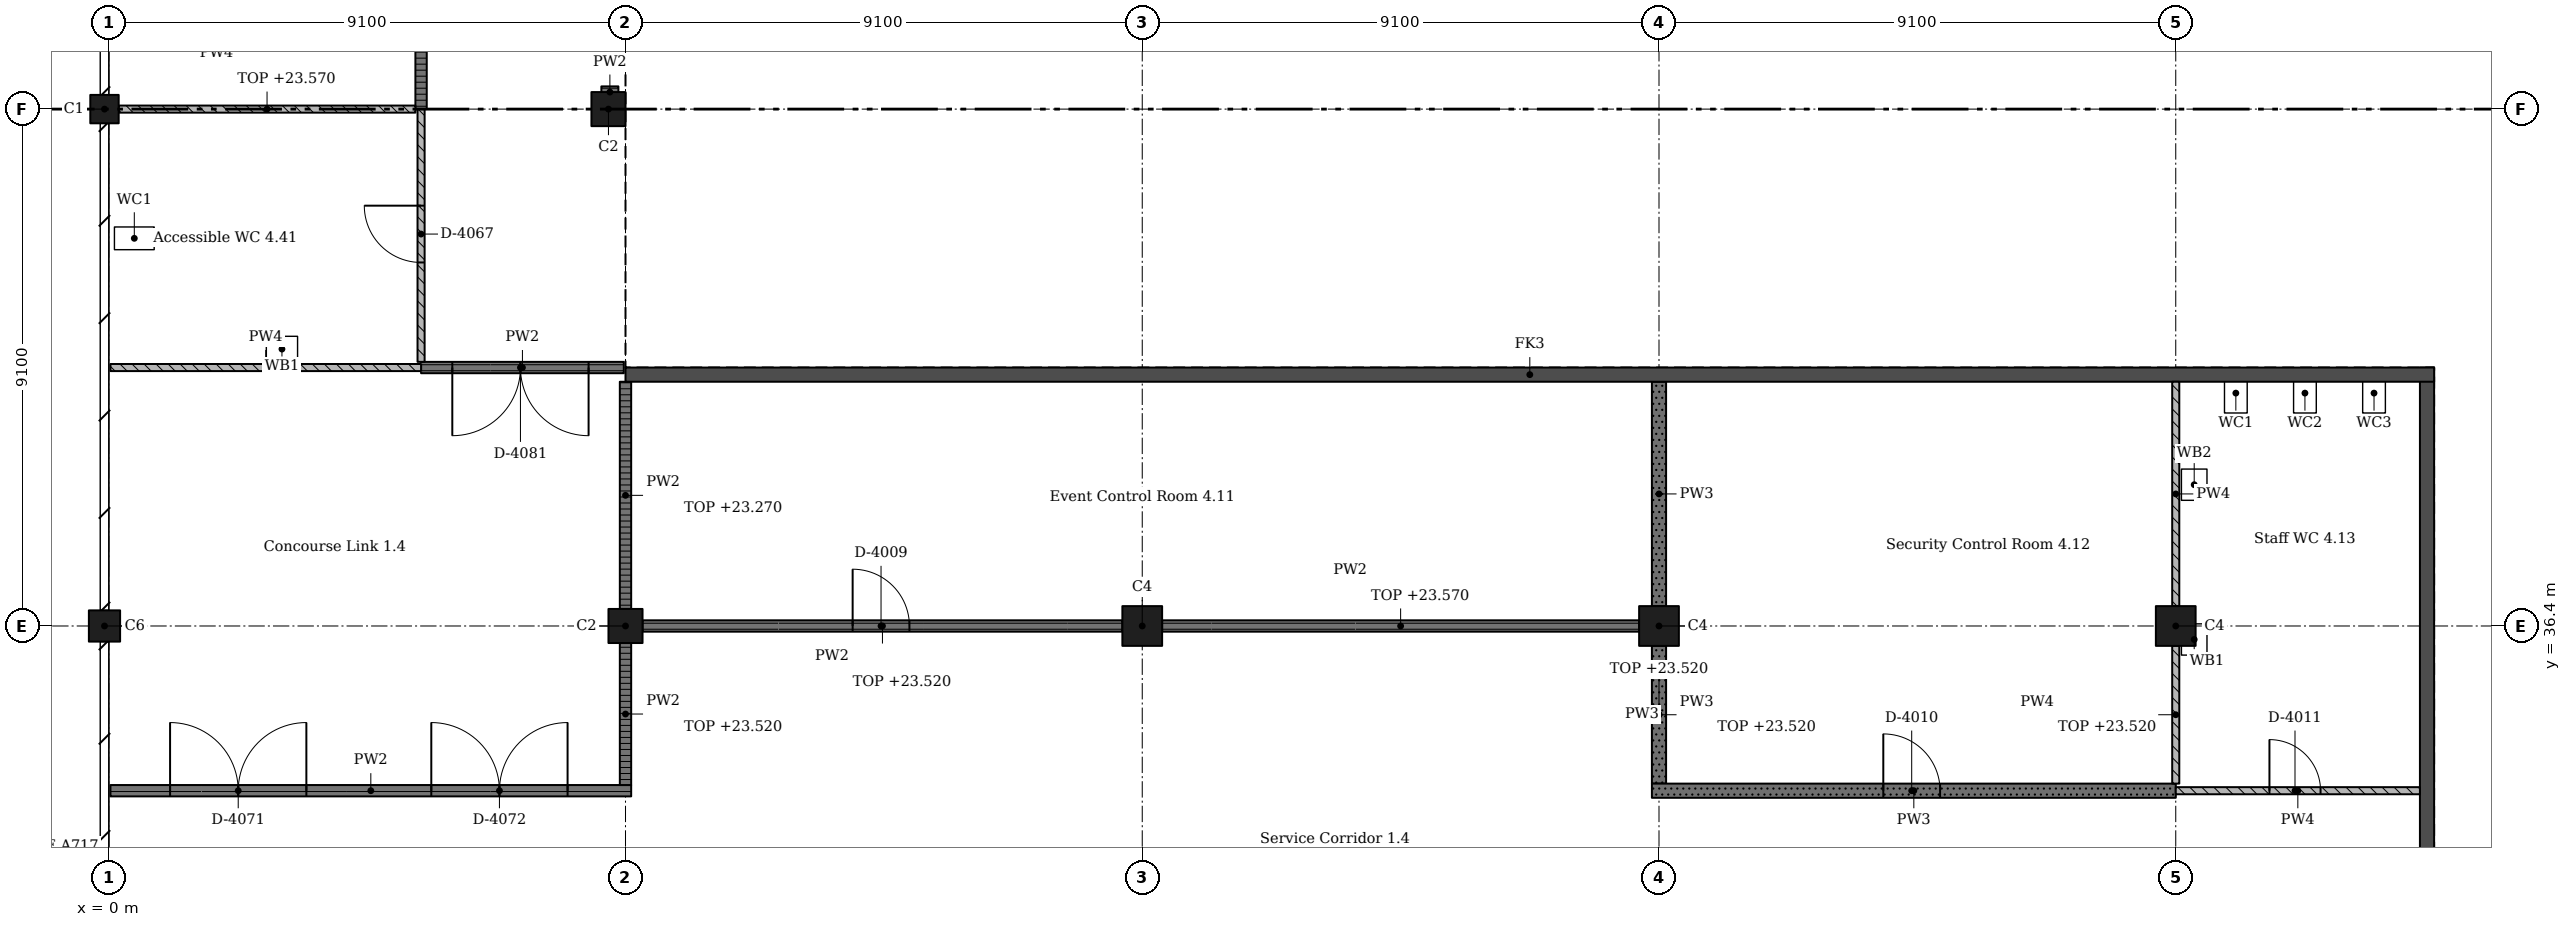
"""IFC4 building model, lengths in metres.
Left out: names, types, materials, properties, quantities, classifications, styles, units other than length and angle.
Written with IfcOpenShell. Run it as: python <this file> out.ifc"""

import sys

from ifc_helpers import new_model, si_unit, direction, frame, frame_2d, origin, origin_2d, place, context, subcontext, project, spatial, rectangle, extrude, element, fill, save


model = new_model("IFC4")
c1 = context("Model", 3, precision=1e-05, world=origin(), true_north=direction((0.0, 1.0)))
c2 = subcontext(c1, "Body", "Model", "MODEL_VIEW")
j1 = project(units=[si_unit("LENGTHUNIT", "METRE"), si_unit("PLANEANGLEUNIT", "RADIAN")], contexts=[c1])
p1 = place(None, origin())
s1 = spatial("IfcSite", under=j1, at=p1, CompositionType="ELEMENT")
p2 = place(p1, origin())
s2 = spatial("IfcBuilding", under=s1, at=p2, CompositionType="ELEMENT")
p3 = place(p2, frame((0.0, 0.0, 20.02)))
s3 = spatial("IfcBuildingStorey", under=s2, at=p3, CompositionType="ELEMENT", Elevation=20.02)
p4 = place(p3, frame((-0.075, 36.4, 0.0), z_axis=(0.0, 0.0, 1.0), x_axis=(1.0, 0.0, 0.0)))
e1 = element("IfcColumn", 1, at=p4, inside=s3, PredefinedType="COLUMN", context=c2, shape_type="SweptSolid", body=[
    extrude(rectangle(XDim=0.55, YDim=0.55, at=origin_2d()), origin(), (0.0, 0.0, 1.0), 4.55),
])
p5 = place(p3, frame((-0.075, 45.5, 0.0), z_axis=(0.0, 0.0, 1.0), x_axis=(1.0, 0.0, 0.0)))
e2 = element("IfcColumn", 2, at=p5, inside=s3, PredefinedType="COLUMN", context=c2, shape_type="SweptSolid", body=[
    extrude(rectangle(XDim=0.5, YDim=0.5, at=origin_2d()), origin(), (0.0, 0.0, 1.0), 4.55),
])
for number, where, z_axis, x_axis in (
    (3, (9.1, 36.4, 0.0), (0.0, 0.0, 1.0), (1.0, 0.0, 0.0)),
    (4, (8.8, 45.5, 0.0), (0.0, 0.0, 1.0), (1.0, 0.0, 0.0)),
):
    element("IfcColumn", number, at=place(p3, frame(where, z_axis=z_axis, x_axis=x_axis)), inside=s3, PredefinedType="COLUMN", context=c2, shape_type="SweptSolid", body=[
        extrude(rectangle(XDim=0.6, YDim=0.6, at=origin_2d()), origin(), (0.0, 0.0, 1.0), 4.55),
    ])
for number, where, z_axis, x_axis in (
    (5, (18.2, 36.4, 0.0), (0.0, 0.0, 1.0), (1.0, 0.0, 0.0)),
    (6, (27.3, 36.4, 0.0), (0.0, 0.0, 1.0), (1.0, 0.0, 0.0)),
    (7, (36.4, 36.4, 0.0), (0.0, 0.0, 1.0), (1.0, 0.0, 0.0)),
):
    element("IfcColumn", number, at=place(p3, frame(where, z_axis=z_axis, x_axis=x_axis)), inside=s3, PredefinedType="COLUMN", context=c2, shape_type="SweptSolid", body=[
        extrude(rectangle(XDim=0.7, YDim=0.7, at=origin_2d()), origin(), (0.0, 0.0, 1.0), 4.55),
    ])
for number, where, z_axis, x_axis in (
    (8, (40.825, 40.95, 0.0), (0.0, 0.0, 1.0), (0.0, -1.0, 0.0)),
    (9, (40.95, 40.825, 0.0), (0.0, 0.0, 1.0), (-1.0, 0.0, 0.0)),
):
    element("IfcWall", number, at=place(p3, frame(where, z_axis=z_axis, x_axis=x_axis)), inside=s3, PredefinedType="SHEAR", context=c2, shape_type="SweptSolid", body=[
        extrude(rectangle(XDim=31.85, YDim=0.25, at=frame_2d((15.925, 0.0))), origin(), (0.0, 0.0, 1.0), 4.55),
    ])
p6 = place(p3, frame((0.03, 33.5, 0.0), z_axis=(0.0, 0.0, 1.0), x_axis=(1.0, 0.0, 0.0)))
e10 = element("IfcWall", 10, at=p6, inside=s3, PredefinedType="PARTITIONING", context=c2, shape_type="SweptSolid", body=[
    extrude(rectangle(XDim=9.17, YDim=0.2, at=frame_2d((4.585, 0.0))), origin(), (0.0, 0.0, 1.0), 4.25),
])
p7 = place(p6, frame((1.05, 0.0, 0.0)))
e11 = element("IfcOpeningElement", 11, at=p7, cuts=e10, PredefinedType="OPENING", context=c2, shape_type="SweptSolid", body=[
    extrude(rectangle(XDim=2.4, YDim=2.4, at=frame_2d((1.2, 1.2))), frame((0.0, 0.11, 0.0), z_axis=(0.0, -1.0, 0.0), x_axis=(1.0, 0.0, 0.0)), (0.0, 0.0, 1.0), 0.22),
])
p8 = place(p6, frame((5.65, 0.0, 0.0)))
e12 = element("IfcOpeningElement", 12, at=p8, cuts=e10, PredefinedType="OPENING", context=c2, shape_type="SweptSolid", body=[
    extrude(rectangle(XDim=2.4, YDim=2.4, at=frame_2d((1.2, 1.2))), frame((0.0, 0.11, 0.0), z_axis=(0.0, -1.0, 0.0), x_axis=(1.0, 0.0, 0.0)), (0.0, 0.0, 1.0), 0.22),
])
p9 = place(p3, frame((0.03, 40.95, 0.0), z_axis=(0.0, 0.0, 1.0), x_axis=(1.0, 0.0, 0.0)))
e13 = element("IfcWall", 13, at=p9, inside=s3, PredefinedType="PARTITIONING", context=c2, shape_type="SweptSolid", body=[
    extrude(rectangle(XDim=5.47, YDim=0.125, at=frame_2d((2.735, 0.0))), origin(), (0.0, 0.0, 1.0), 4.25),
])
p10 = place(p3, frame((0.175, 45.5, 0.0), z_axis=(0.0, 0.0, 1.0), x_axis=(1.0, 0.0, 0.0)))
e14 = element("IfcWall", 14, at=p10, inside=s3, PredefinedType="PARTITIONING", context=c2, shape_type="SweptSolid", body=[
    extrude(rectangle(XDim=5.225, YDim=0.125, at=frame_2d((2.612, 0.0))), origin(), (0.0, 0.0, 1.0), 3.55),
])
p11 = place(p3, frame((5.5, 40.95, 0.0), z_axis=(0.0, 0.0, 1.0), x_axis=(1.0, 0.0, 0.0)))
e15 = element("IfcWall", 15, at=p11, inside=s3, PredefinedType="PARTITIONING", context=c2, shape_type="SweptSolid", body=[
    extrude(rectangle(XDim=3.57, YDim=0.2, at=frame_2d((1.785, 0.0))), origin(), (0.0, 0.0, 1.0), 4.25),
])
p12 = place(p11, frame((0.55, 0.0, 0.0)))
e16 = element("IfcOpeningElement", 16, at=p12, cuts=e15, PredefinedType="OPENING", context=c2, shape_type="SweptSolid", body=[
    extrude(rectangle(XDim=2.4, YDim=2.4, at=frame_2d((1.2, 1.2))), frame((0.0, 0.11, 0.0), z_axis=(0.0, -1.0, 0.0), x_axis=(1.0, 0.0, 0.0)), (0.0, 0.0, 1.0), 0.22),
])
p13 = place(p3, frame((5.5, 41.05, 0.0), z_axis=(0.0, 0.0, 1.0), x_axis=(0.0, 1.0, 0.0)))
e17 = element("IfcWall", 17, at=p13, inside=s3, PredefinedType="PARTITIONING", context=c2, shape_type="SweptSolid", body=[
    extrude(rectangle(XDim=4.45, YDim=0.125, at=frame_2d((2.225, 0.0))), origin(), (0.0, 0.0, 1.0), 4.25),
])
p14 = place(p13, frame((1.75, 0.0, 0.0)))
e18 = element("IfcOpeningElement", 18, at=p14, cuts=e17, PredefinedType="OPENING", context=c2, shape_type="SweptSolid", body=[
    extrude(rectangle(XDim=1.0, YDim=2.1, at=frame_2d((0.5, 1.05))), frame((0.0, 0.073, 0.0), z_axis=(0.0, -1.0, 0.0), x_axis=(1.0, 0.0, 0.0)), (0.0, 0.0, 1.0), 0.145),
])
p15 = place(p3, frame((5.5, 45.5, 0.0), z_axis=(0.0, 0.0, 1.0), x_axis=(0.0, 1.0, 0.0)))
e19 = element("IfcWall", 19, at=p15, inside=s3, PredefinedType="PARTITIONING", context=c2, shape_type="SweptSolid", body=[
    extrude(rectangle(XDim=9.1, YDim=0.2, at=frame_2d((4.55, 0.0))), origin(), (0.0, 0.0, 1.0), 4.25),
])
p16 = place(p15, frame((4.05, 0.0, 0.0)))
e20 = element("IfcOpeningElement", 20, at=p16, cuts=e19, PredefinedType="OPENING", context=c2, shape_type="SweptSolid", body=[
    extrude(rectangle(XDim=1.0, YDim=2.1, at=frame_2d((0.5, 1.05))), frame((0.0, 0.11, 0.0), z_axis=(0.0, -1.0, 0.0), x_axis=(1.0, 0.0, 0.0)), (0.0, 0.0, 1.0), 0.22),
])
p17 = place(p3, frame((8.975, 45.8, 0.0), z_axis=(0.0, 0.0, 1.0), x_axis=(-1.0, 0.0, 0.0)))
e21 = element("IfcWall", 21, at=p17, inside=s3, PredefinedType="PARTITIONING", context=c2, shape_type="SweptSolid", body=[
    extrude(rectangle(XDim=0.3, YDim=0.2, at=frame_2d((0.15, 0.0))), origin(), (0.0, 0.0, 1.0), 4.25),
])
p18 = place(p3, frame((9.1, 33.6, 0.0), z_axis=(0.0, 0.0, 1.0), x_axis=(0.0, 1.0, 0.0)))
e22 = element("IfcWall", 22, at=p18, inside=s3, PredefinedType="PARTITIONING", context=c2, shape_type="SweptSolid", body=[
    extrude(rectangle(XDim=2.5, YDim=0.2, at=frame_2d((1.25, 0.0))), origin(), (0.0, 0.0, 1.0), 3.5),
])
p19 = place(p3, frame((9.1, 36.7, 0.0), z_axis=(0.0, 0.0, 1.0), x_axis=(0.0, 1.0, 0.0)))
e23 = element("IfcWall", 23, at=p19, inside=s3, PredefinedType="PARTITIONING", context=c2, shape_type="SweptSolid", body=[
    extrude(rectangle(XDim=4.0, YDim=0.2, at=frame_2d((2.0, 0.0))), origin(), (0.0, 0.0, 1.0), 3.25),
])
p20 = place(p3, frame((17.85, 36.4, 0.0), z_axis=(0.0, 0.0, 1.0), x_axis=(-1.0, 0.0, 0.0)))
e24 = element("IfcWall", 24, at=p20, inside=s3, PredefinedType="PARTITIONING", context=c2, shape_type="SweptSolid", body=[
    extrude(rectangle(XDim=8.45, YDim=0.2, at=frame_2d((4.225, 0.0))), origin(), (0.0, 0.0, 1.0), 3.5),
])
p21 = place(p20, frame((3.75, 0.0, 0.0)))
e25 = element("IfcOpeningElement", 25, at=p21, cuts=e24, PredefinedType="OPENING", context=c2, shape_type="SweptSolid", body=[
    extrude(rectangle(XDim=1.0, YDim=2.1, at=frame_2d((0.5, 1.05))), frame((0.0, 0.11, 0.0), z_axis=(0.0, -1.0, 0.0), x_axis=(1.0, 0.0, 0.0)), (0.0, 0.0, 1.0), 0.22),
])
p22 = place(p3, frame((26.95, 36.4, 0.0), z_axis=(0.0, 0.0, 1.0), x_axis=(-1.0, 0.0, 0.0)))
e26 = element("IfcWall", 26, at=p22, inside=s3, PredefinedType="PARTITIONING", context=c2, shape_type="SweptSolid", body=[
    extrude(rectangle(XDim=8.4, YDim=0.2, at=frame_2d((4.2, 0.0))), origin(), (0.0, 0.0, 1.0), 3.55),
])
p23 = place(p3, frame((27.3, 33.625, 0.0), z_axis=(0.0, 0.0, 1.0), x_axis=(0.0, 1.0, 0.0)))
e27 = element("IfcWall", 27, at=p23, inside=s3, PredefinedType="SOLIDWALL", context=c2, shape_type="SweptSolid", body=[
    extrude(rectangle(XDim=2.425, YDim=0.25, at=frame_2d((1.212, 0.0))), origin(), (0.0, 0.0, 1.0), 3.5),
])
p24 = place(p3, frame((27.3, 40.7, 0.0), z_axis=(0.0, 0.0, 1.0), x_axis=(0.0, -1.0, 0.0)))
e28 = element("IfcWall", 28, at=p24, inside=s3, PredefinedType="SOLIDWALL", context=c2, shape_type="SweptSolid", body=[
    extrude(rectangle(XDim=3.95, YDim=0.25, at=frame_2d((1.975, 0.0))), origin(), (0.0, 0.0, 1.0), 4.25),
])
p25 = place(p3, frame((36.4, 33.5, 0.0), z_axis=(0.0, 0.0, 1.0), x_axis=(-1.0, 0.0, 0.0)))
e29 = element("IfcWall", 29, at=p25, inside=s3, PredefinedType="SOLIDWALL", context=c2, shape_type="SweptSolid", body=[
    extrude(rectangle(XDim=9.225, YDim=0.25, at=frame_2d((4.612, 0.0))), origin(), (0.0, 0.0, 1.0), 4.25),
])
p26 = place(p25, frame((4.15, 0.0, 0.0)))
e30 = element("IfcOpeningElement", 30, at=p26, cuts=e29, PredefinedType="OPENING", context=c2, shape_type="SweptSolid", body=[
    extrude(rectangle(XDim=1.0, YDim=2.1, at=frame_2d((0.5, 1.05))), frame((0.0, 0.135, 0.0), z_axis=(0.0, -1.0, 0.0), x_axis=(1.0, 0.0, 0.0)), (0.0, 0.0, 1.0), 0.27),
])
p27 = place(p3, frame((36.4, 36.05, 0.0), z_axis=(0.0, 0.0, 1.0), x_axis=(0.0, -1.0, 0.0)))
e31 = element("IfcWall", 31, at=p27, inside=s3, PredefinedType="PARTITIONING", context=c2, shape_type="SweptSolid", body=[
    extrude(rectangle(XDim=2.425, YDim=0.125, at=frame_2d((1.212, 0.0))), origin(), (0.0, 0.0, 1.0), 3.5),
])
p28 = place(p3, frame((36.4, 40.7, 0.0), z_axis=(0.0, 0.0, 1.0), x_axis=(0.0, -1.0, 0.0)))
e32 = element("IfcWall", 32, at=p28, inside=s3, PredefinedType="PARTITIONING", context=c2, shape_type="SweptSolid", body=[
    extrude(rectangle(XDim=3.95, YDim=0.125, at=frame_2d((1.975, 0.0))), origin(), (0.0, 0.0, 1.0), 4.25),
])
p29 = place(p3, frame((40.7, 33.5, 0.0), z_axis=(0.0, 0.0, 1.0), x_axis=(-1.0, 0.0, 0.0)))
e33 = element("IfcWall", 33, at=p29, inside=s3, PredefinedType="PARTITIONING", context=c2, shape_type="SweptSolid", body=[
    extrude(rectangle(XDim=4.3, YDim=0.125, at=frame_2d((2.15, 0.0))), origin(), (0.0, 0.0, 1.0), 4.25),
])
p30 = place(p29, frame((1.75, 0.0, 0.0)))
e34 = element("IfcOpeningElement", 34, at=p30, cuts=e33, PredefinedType="OPENING", context=c2, shape_type="SweptSolid", body=[
    extrude(rectangle(XDim=0.9, YDim=2.1, at=frame_2d((0.45, 1.05))), frame((0.0, 0.073, 0.0), z_axis=(0.0, -1.0, 0.0), x_axis=(1.0, 0.0, 0.0)), (0.0, 0.0, 1.0), 0.145),
])
p31 = place(p21, origin())
e35 = element("IfcDoor", 35, at=p31, inside=s3, OperationType="SINGLE_SWING_RIGHT", PredefinedType="DOOR", context=c2, shape_type="SweptSolid", body=[
    extrude(rectangle(XDim=1.0, YDim=2.1, at=frame_2d((0.5, 1.05))), frame((0.0, 0.025, 0.0), z_axis=(0.0, -1.0, 0.0), x_axis=(1.0, 0.0, 0.0)), (0.0, 0.0, 1.0), 0.05),
])
fill(e25, e35)
p32 = place(p26, origin())
e36 = element("IfcDoor", 36, at=p32, inside=s3, OperationType="SINGLE_SWING_RIGHT", PredefinedType="DOOR", context=c2, shape_type="SweptSolid", body=[
    extrude(rectangle(XDim=1.0, YDim=2.1, at=frame_2d((0.5, 1.05))), frame((0.0, 0.025, 0.0), z_axis=(0.0, -1.0, 0.0), x_axis=(1.0, 0.0, 0.0)), (0.0, 0.0, 1.0), 0.05),
])
fill(e30, e36)
p33 = place(p30, origin())
e37 = element("IfcDoor", 37, at=p33, inside=s3, OperationType="SINGLE_SWING_RIGHT", PredefinedType="DOOR", context=c2, shape_type="SweptSolid", body=[
    extrude(rectangle(XDim=0.9, YDim=2.1, at=frame_2d((0.45, 1.05))), frame((0.0, 0.025, 0.0), z_axis=(0.0, -1.0, 0.0), x_axis=(1.0, 0.0, 0.0)), (0.0, 0.0, 1.0), 0.05),
])
fill(e34, e37)
p34 = place(p14, origin())
e38 = element("IfcDoor", 38, at=p34, inside=s3, OperationType="SINGLE_SWING_LEFT", PredefinedType="DOOR", context=c2, shape_type="SweptSolid", body=[
    extrude(rectangle(XDim=1.0, YDim=2.1, at=frame_2d((0.5, 1.05))), frame((0.0, 0.025, 0.0), z_axis=(0.0, -1.0, 0.0), x_axis=(1.0, 0.0, 0.0)), (0.0, 0.0, 1.0), 0.05),
])
fill(e18, e38)
p35 = place(p7, origin())
e39 = element("IfcDoor", 39, at=p35, inside=s3, OperationType="DOUBLE_DOOR_SINGLE_SWING", PredefinedType="DOOR", context=c2, shape_type="SweptSolid", body=[
    extrude(rectangle(XDim=2.4, YDim=2.4, at=frame_2d((1.2, 1.2))), frame((0.0, 0.025, 0.0), z_axis=(0.0, -1.0, 0.0), x_axis=(1.0, 0.0, 0.0)), (0.0, 0.0, 1.0), 0.05),
])
fill(e11, e39)
p36 = place(p8, origin())
e40 = element("IfcDoor", 40, at=p36, inside=s3, OperationType="DOUBLE_DOOR_SINGLE_SWING", PredefinedType="DOOR", context=c2, shape_type="SweptSolid", body=[
    extrude(rectangle(XDim=2.4, YDim=2.4, at=frame_2d((1.2, 1.2))), frame((0.0, 0.025, 0.0), z_axis=(0.0, -1.0, 0.0), x_axis=(1.0, 0.0, 0.0)), (0.0, 0.0, 1.0), 0.05),
])
fill(e12, e40)
p37 = place(p12, origin())
e41 = element("IfcDoor", 41, at=p37, inside=s3, OperationType="DOUBLE_DOOR_SINGLE_SWING", PredefinedType="DOOR", context=c2, shape_type="SweptSolid", body=[
    extrude(rectangle(XDim=2.4, YDim=2.4, at=frame_2d((1.2, 1.2))), frame((0.0, 0.025, 0.0), z_axis=(0.0, -1.0, 0.0), x_axis=(1.0, 0.0, 0.0)), (0.0, 0.0, 1.0), 0.05),
])
fill(e16, e41)
save(model, sys.argv[1])
